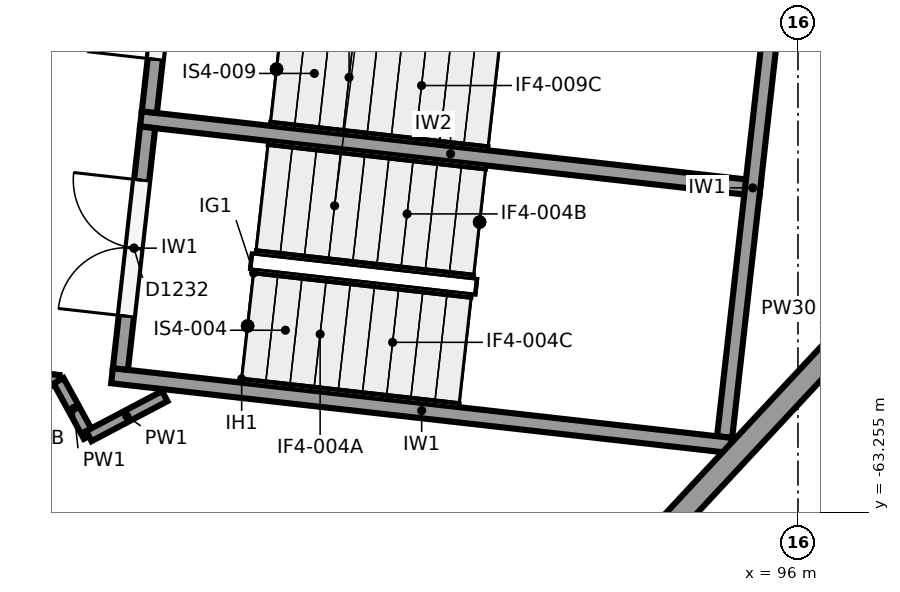
"""IFC4 building model, lengths in metres.
Left out: names, types, materials, properties, quantities, classifications, styles, units other than length and angle.
Written with IfcOpenShell. Run it as: python <this file> out.ifc"""

import sys

from ifc_helpers import new_model, si_unit, direction, frame, frame_2d, origin, place, context, subcontext, project, spatial, rectangle, extrude, element, fill, save


model = new_model("IFC4")
c1 = context("Model", 3, precision=1e-05, world=origin(), true_north=direction((0.0, 1.0)))
c2 = subcontext(c1, "Body", "Model", "MODEL_VIEW")
j1 = project(units=[si_unit("LENGTHUNIT", "METRE"), si_unit("PLANEANGLEUNIT", "RADIAN")], contexts=[c1])
p1 = place(None, origin())
s1 = spatial("IfcSite", under=j1, at=p1, CompositionType="ELEMENT")
p2 = place(p1, origin())
s2 = spatial("IfcBuilding", under=s1, at=p2, CompositionType="ELEMENT")
p3 = place(p2, frame((0.0, 0.0, 12.0)))
s3 = spatial("IfcBuildingStorey", under=s2, at=p3, CompositionType="ELEMENT", Elevation=12.0)
p4 = place(p3, frame((100.711, -56.568, 0.0), z_axis=(0.0, 0.0, 1.0), x_axis=(-0.681794658463, -0.731543603411, 0.0)))
e1 = element("IfcWall", 1, at=p4, inside=s3, PredefinedType="SOLIDWALL", context=c2, shape_type="SweptSolid", body=[
    extrude(rectangle(XDim=12.514, YDim=0.3, at=frame_2d((6.257, 0.0))), origin(), (0.0, 0.0, 1.0), 4.35),
])
p5 = place(p3, frame((95.123, -62.378, 0.0), z_axis=(0.0, 0.0, 1.0), x_axis=(-0.993710792168, 0.111977058046, 0.0)))
e2 = element("IfcWall", 2, at=p5, inside=s3, PredefinedType="SHEAR", context=c2, shape_type="SweptSolid", body=[
    extrude(rectangle(XDim=8.2, YDim=0.2, at=frame_2d((4.1, 0.0))), origin(), (0.0, 0.0, 1.0), 5.65),
])
p6 = place(p3, frame((95.035, -62.267, 0.0), z_axis=(0.0, 0.0, 1.0), x_axis=(0.111933579504, 0.993715690617, 0.0)))
e3 = element("IfcWall", 3, at=p6, inside=s3, PredefinedType="SHEAR", context=c2, shape_type="SweptSolid", body=[
    extrude(rectangle(XDim=6.6, YDim=0.2, at=frame_2d((3.3, 0.0))), origin(), (0.0, 0.0, 1.0), 5.65),
])
p7 = place(p3, frame((95.504, -58.999, 0.0), z_axis=(0.0, 0.0, 1.0), x_axis=(-0.993710792168, 0.111977058046, 0.0)))
e4 = element("IfcWall", 4, at=p7, inside=s3, PredefinedType="SHEAR", context=c2, shape_type="SweptSolid", body=[
    extrude(rectangle(XDim=8.2, YDim=0.2, at=frame_2d((4.1, 0.0))), origin(), (0.0, 0.0, 1.0), 5.65),
])
p8 = place(p3, frame((87.085, -61.372, 0.0), z_axis=(0.0, 0.0, 1.0), x_axis=(0.11192190762, 0.993717005286, 0.0)))
e5 = element("IfcWall", 5, at=p8, inside=s3, PredefinedType="SHEAR", context=c2, shape_type="SweptSolid", body=[
    extrude(rectangle(XDim=3.2, YDim=0.2, at=frame_2d((1.6, 0.0))), origin(), (0.0, 0.0, 1.0), 5.65),
])
p9 = place(p8, frame((0.7, 0.0, 0.0)))
e6 = element("IfcOpeningElement", 6, at=p9, cuts=e5, PredefinedType="OPENING", context=c2, shape_type="SweptSolid", body=[
    extrude(rectangle(XDim=1.8, YDim=2.1, at=frame_2d((0.9, 1.05))), frame((0.0, 0.11, 0.0), z_axis=(0.0, -1.0, 0.0), x_axis=(1.0, 0.0, 0.0)), (0.0, 0.0, 1.0), 0.22),
])
p10 = place(p3, frame((87.466, -57.993, 0.0), z_axis=(0.0, 0.0, 1.0), x_axis=(0.111997244021, 0.993708517288, 0.0)))
e7 = element("IfcWall", 7, at=p10, inside=s3, PredefinedType="SHEAR", context=c2, shape_type="SweptSolid", body=[
    extrude(rectangle(XDim=3.2, YDim=0.2, at=frame_2d((1.6, 0.0))), origin(), (0.0, 0.0, 1.0), 5.65),
])
p11 = place(p10, frame((0.7, 0.0, 0.0)))
e8 = element("IfcOpeningElement", 8, at=p11, cuts=e7, PredefinedType="OPENING", context=c2, shape_type="SweptSolid", body=[
    extrude(rectangle(XDim=1.8, YDim=2.1, at=frame_2d((0.9, 1.05))), frame((0.0, 0.11, 0.0), z_axis=(0.0, -1.0, 0.0), x_axis=(1.0, 0.0, 0.0)), (0.0, 0.0, 1.0), 0.22),
])
p12 = place(p3, frame((79.958, -60.815, 0.0), z_axis=(0.0, 0.0, 1.0), x_axis=(0.99370867388, -0.111995854638, 0.0)))
e9 = element("IfcWall", 9, at=p12, inside=s3, PredefinedType="PARTITIONING", context=c2, shape_type="SweptSolid", body=[
    extrude(rectangle(XDim=6.354, YDim=0.15, at=frame_2d((3.177, 0.0))), origin(), (0.0, 0.0, 1.0), 4.55),
])
p13 = place(p12, frame((3.85, 0.0, 0.0)))
e10 = element("IfcOpeningElement", 10, at=p13, cuts=e9, PredefinedType="OPENING", context=c2, shape_type="SweptSolid", body=[
    extrude(rectangle(XDim=1.8, YDim=2.1, at=frame_2d((0.9, 1.05))), frame((0.0, 0.085, 0.0), z_axis=(0.0, -1.0, 0.0), x_axis=(1.0, 0.0, 0.0)), (0.0, 0.0, 1.0), 0.17),
])
p14 = place(p3, frame((85.622, -61.453, 4.55), z_axis=(0.0, 0.0, 1.0), x_axis=(0.993672626597, -0.11231523117, 0.0)))
e11 = element("IfcWall", 11, at=p14, inside=s3, PredefinedType="PARTITIONING", context=c2, shape_type="SweptSolid", body=[
    extrude(rectangle(XDim=0.654, YDim=0.15, at=frame_2d((0.327, 0.0))), origin(), (0.0, 0.0, 1.0), 1.1),
])
p15 = place(p3, frame((86.272, -61.527, 0.0), z_axis=(0.0, 0.0, 1.0), x_axis=(0.480336186773, -0.877084458691, 0.0)))
e12 = element("IfcWall", 12, at=p15, inside=s3, PredefinedType="PARTITIONING", context=c2, shape_type="SweptSolid", body=[
    extrude(rectangle(XDim=0.83, YDim=0.15, at=frame_2d((0.415, 0.0))), origin(), (0.0, 0.0, 1.0), 5.65),
])
p16 = place(p3, frame((86.67, -62.254, 0.0), z_axis=(0.0, 0.0, 1.0), x_axis=(0.884880656279, 0.465817801446, 0.0)))
e13 = element("IfcWall", 13, at=p16, inside=s3, PredefinedType="PARTITIONING", context=c2, shape_type="SweptSolid", body=[
    extrude(rectangle(XDim=1.128, YDim=0.15, at=frame_2d((0.564, 0.0))), origin(), (0.0, 0.0, 1.0), 5.65),
])
p17 = place(p9, origin())
e14 = element("IfcDoor", 14, at=p17, inside=s3, OperationType="DOUBLE_DOOR_SINGLE_SWING", PredefinedType="DOOR", context=c2, shape_type="SweptSolid", body=[
    extrude(rectangle(XDim=1.8, YDim=2.1, at=frame_2d((0.9, 1.05))), frame((0.0, 0.025, 0.0), z_axis=(0.0, -1.0, 0.0), x_axis=(1.0, 0.0, 0.0)), (0.0, 0.0, 1.0), 0.05),
])
fill(e6, e14)
p18 = place(p11, origin())
e15 = element("IfcDoor", 15, at=p18, inside=s3, OperationType="DOUBLE_DOOR_SINGLE_SWING", PredefinedType="DOOR", context=c2, shape_type="SweptSolid", body=[
    extrude(rectangle(XDim=1.8, YDim=2.1, at=frame_2d((0.9, 1.05))), frame((0.0, 0.025, 0.0), z_axis=(0.0, -1.0, 0.0), x_axis=(1.0, 0.0, 0.0)), (0.0, 0.0, 1.0), 0.05),
])
fill(e8, e15)
save(model, sys.argv[1])
